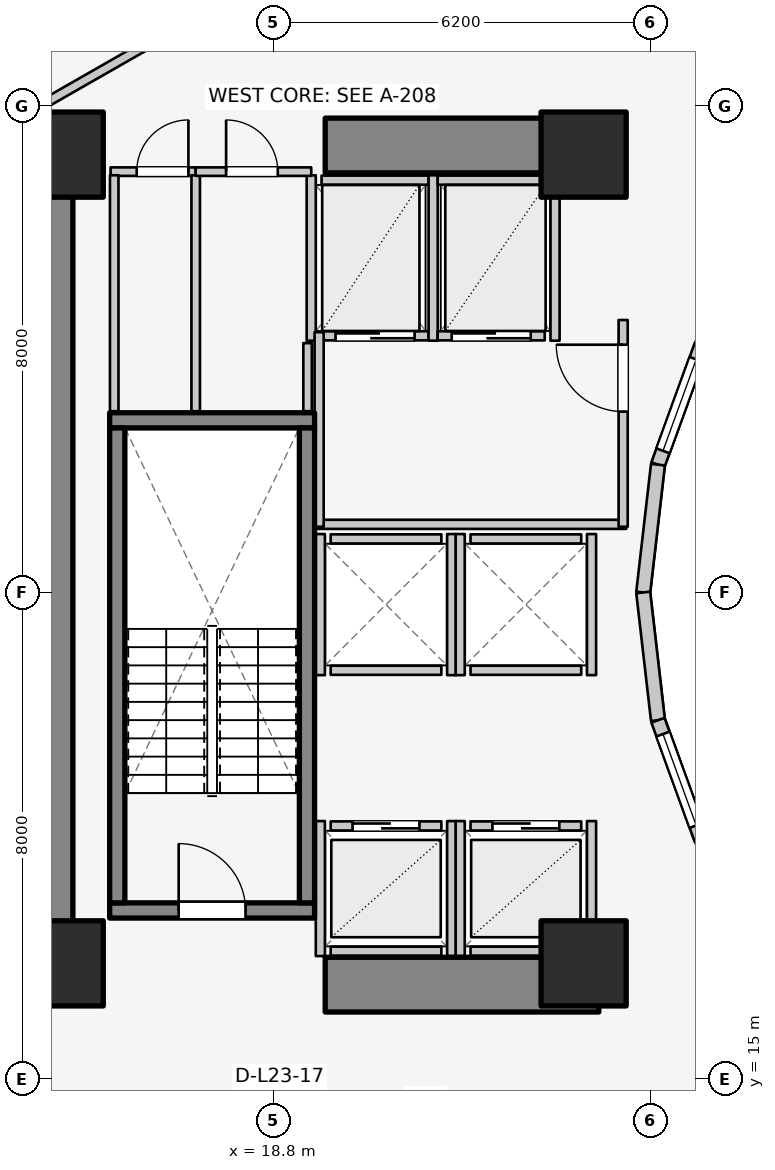
"""IFC4 building model, lengths in metres.
Left out: names, types, materials, properties, quantities, classifications, styles, units other than length and angle.
Written with IfcOpenShell. Run it as: python <this file> out.ifc"""

import sys

from ifc_helpers import new_model, si_unit, direction, frame, frame_2d, origin, origin_2d, place, context, subcontext, project, spatial, rectangle, extrude, element, fill, save


model = new_model("IFC4")
c1 = context("Model", 3, precision=1e-05, world=origin(), true_north=direction((0.0, 1.0)))
c2 = subcontext(c1, "Body", "Model", "MODEL_VIEW")
j1 = project(units=[si_unit("LENGTHUNIT", "METRE"), si_unit("PLANEANGLEUNIT", "RADIAN")], contexts=[c1])
p1 = place(None, origin())
s1 = spatial("IfcSite", under=j1, at=p1, CompositionType="ELEMENT")
p2 = place(p1, origin())
s2 = spatial("IfcBuilding", under=s1, at=p2, CompositionType="ELEMENT")
p3 = place(p2, frame((0.0, 0.0, 79.4)))
s3 = spatial("IfcBuildingStorey", under=s2, at=p3, CompositionType="ELEMENT", Elevation=79.4)
p4 = place(p3, frame((15.05, 17.05, 0.0), z_axis=(0.0, 0.0, 1.0), x_axis=(0.0, 1.0, 0.0)))
e1 = element("IfcWall", 1, at=p4, inside=s3, PredefinedType="SHEAR", context=c2, shape_type="SweptSolid", body=[
    extrude(rectangle(XDim=12.8, YDim=0.9, at=frame_2d((6.4, 0.0))), origin(), (0.0, 0.0, 1.0), 3.1),
])
for number, where, z_axis, x_axis in (
    (2, (19.65, 16.55, 0.0), (0.0, 0.0, 1.0), (1.0, 0.0, 0.0)),
    (3, (19.65, 30.35, 0.0), (0.0, 0.0, 1.0), (1.0, 0.0, 0.0)),
):
    element("IfcWall", number, at=place(p3, frame(where, z_axis=z_axis, x_axis=x_axis)), inside=s3, PredefinedType="SHEAR", context=c2, shape_type="SweptSolid", body=[
        extrude(rectangle(XDim=4.5, YDim=0.9, at=frame_2d((2.25, 0.0))), origin(), (0.0, 0.0, 1.0), 3.1),
    ])
p5 = place(p3, frame((16.105, 17.77, 0.0), z_axis=(0.0, 0.0, 1.0), x_axis=(1.0, 0.0, 0.0)))
e4 = element("IfcWall", 4, at=p5, inside=s3, PredefinedType="SOLIDWALL", context=c2, shape_type="SweptSolid", body=[
    extrude(rectangle(XDim=3.37, YDim=0.25, at=frame_2d((1.685, 0.0))), origin(), (0.0, 0.0, 1.0), 3.1),
])
p6 = place(p5, frame((1.135, 0.0, 0.0)))
e5 = element("IfcOpeningElement", 5, at=p6, cuts=e4, PredefinedType="OPENING", context=c2, shape_type="SweptSolid", body=[
    extrude(rectangle(XDim=1.1, YDim=2.1, at=frame_2d((0.55, 1.05))), frame((0.0, 0.135, 0.0), z_axis=(0.0, -1.0, 0.0), x_axis=(1.0, 0.0, 0.0)), (0.0, 0.0, 1.0), 0.27),
])
p7 = place(p3, frame((16.105, 25.83, 0.0), z_axis=(0.0, 0.0, 1.0), x_axis=(1.0, 0.0, 0.0)))
e6 = element("IfcWall", 6, at=p7, inside=s3, PredefinedType="SOLIDWALL", context=c2, shape_type="SweptSolid", body=[
    extrude(rectangle(XDim=3.37, YDim=0.25, at=frame_2d((1.685, 0.0))), origin(), (0.0, 0.0, 1.0), 3.1),
])
for number, where, z_axis, x_axis in (
    (7, (16.23, 17.895, 0.0), (0.0, 0.0, 1.0), (0.0, 1.0, 0.0)),
    (8, (19.35, 17.895, 0.0), (0.0, 0.0, 1.0), (0.0, 1.0, 0.0)),
):
    element("IfcWall", number, at=place(p3, frame(where, z_axis=z_axis, x_axis=x_axis)), inside=s3, PredefinedType="SOLIDWALL", context=c2, shape_type="SweptSolid", body=[
        extrude(rectangle(XDim=7.81, YDim=0.25, at=frame_2d((3.905, 0.0))), origin(), (0.0, 0.0, 1.0), 3.1),
    ])
for number, where, z_axis, x_axis in (
    (9, (15.3, 16.9, 0.0), (0.0, 0.0, 1.0), (1.0, 0.0, 0.0)),
    (10, (23.9, 16.9, 0.0), (0.0, 0.0, 1.0), (1.0, 0.0, 0.0)),
    (11, (23.9, 30.2, 0.0), (0.0, 0.0, 1.0), (1.0, 0.0, 0.0)),
    (12, (15.3, 30.2, 0.0), (0.0, 0.0, 1.0), (1.0, 0.0, 0.0)),
):
    element("IfcColumn", number, at=place(p3, frame(where, z_axis=z_axis, x_axis=x_axis)), inside=s3, PredefinedType="COLUMN", context=c2, shape_type="SweptSolid", body=[
        extrude(rectangle(XDim=1.4, YDim=1.4, at=origin_2d()), origin(), (0.0, 0.0, 1.0), 3.1),
    ])
p8 = place(p3, frame((25.834, 27.06, 0.0), z_axis=(0.0, 0.0, 1.0), x_axis=(-0.341423187295, -0.93990968033, 0.0)))
e13 = element("IfcWall", 13, at=p8, inside=s3, PredefinedType="STANDARD", context=c2, shape_type="SweptSolid", body=[
    extrude(rectangle(XDim=2.084, YDim=0.23, at=frame_2d((1.042, 0.0))), origin(), (0.0, 0.0, 1.0), 2.84),
])
p9 = place(p8, frame((0.242, 0.0, 0.85)))
e14 = element("IfcOpeningElement", 14, at=p9, cuts=e13, PredefinedType="OPENING", context=c2, shape_type="SweptSolid", body=[
    extrude(rectangle(XDim=1.6, YDim=1.65, at=frame_2d((0.8, 0.825))), frame((0.0, 0.125, 0.0), z_axis=(0.0, -1.0, 0.0), x_axis=(1.0, 0.0, 0.0)), (0.0, 0.0, 1.0), 0.25),
])
for number, where, z_axis, x_axis in (
    (15, (25.123, 25.102, 0.0), (0.0, 0.0, 1.0), (-0.115, -0.993, 0.0)),
    (16, (24.88, 23.0, 0.0), (0.0, 0.0, 1.0), (0.115, -0.993, 0.0)),
):
    element("IfcWall", number, at=place(p3, frame(where, z_axis=z_axis, x_axis=x_axis)), inside=s3, PredefinedType="STANDARD", context=c2, shape_type="SweptSolid", body=[
        extrude(rectangle(XDim=2.115, YDim=0.23, at=frame_2d((1.058, 0.0))), origin(), (0.0, 0.0, 1.0), 2.84),
    ])
p10 = place(p3, frame((25.123, 20.898, 0.0), z_axis=(0.0, 0.0, 1.0), x_axis=(0.341423187295, -0.93990968033, 0.0)))
e17 = element("IfcWall", 17, at=p10, inside=s3, PredefinedType="STANDARD", context=c2, shape_type="SweptSolid", body=[
    extrude(rectangle(XDim=2.084, YDim=0.23, at=frame_2d((1.042, 0.0))), origin(), (0.0, 0.0, 1.0), 2.84),
])
p11 = place(p10, frame((0.242, 0.0, 0.85)))
e18 = element("IfcOpeningElement", 18, at=p11, cuts=e17, PredefinedType="OPENING", context=c2, shape_type="SweptSolid", body=[
    extrude(rectangle(XDim=1.6, YDim=1.65, at=frame_2d((0.8, 0.825))), frame((0.0, 0.125, 0.0), z_axis=(0.0, -1.0, 0.0), x_axis=(1.0, 0.0, 0.0)), (0.0, 0.0, 1.0), 0.25),
])
p12 = place(p3, frame((19.74, 19.16, 0.0), z_axis=(0.0, 0.0, 1.0), x_axis=(1.0, 0.0, 0.0)))
e19 = element("IfcWall", 19, at=p12, inside=s3, PredefinedType="SOLIDWALL", context=c2, shape_type="SweptSolid", body=[
    extrude(rectangle(XDim=1.82, YDim=0.15, at=frame_2d((0.91, 0.0))), origin(), (0.0, 0.0, 1.0), 2.855),
])
p13 = place(p12, frame((0.36, 0.0, 0.0)))
e20 = element("IfcOpeningElement", 20, at=p13, cuts=e19, PredefinedType="OPENING", context=c2, shape_type="SweptSolid", body=[
    extrude(rectangle(XDim=1.1, YDim=2.1, at=frame_2d((0.55, 1.05))), frame((0.0, 0.085, 0.0), z_axis=(0.0, -1.0, 0.0), x_axis=(1.0, 0.0, 0.0)), (0.0, 0.0, 1.0), 0.17),
])
p14 = place(p3, frame((19.74, 17.1, 0.0), z_axis=(0.0, 0.0, 1.0), x_axis=(1.0, 0.0, 0.0)))
e21 = element("IfcWall", 21, at=p14, inside=s3, PredefinedType="SOLIDWALL", context=c2, shape_type="SweptSolid", body=[
    extrude(rectangle(XDim=1.82, YDim=0.15, at=frame_2d((0.91, 0.0))), origin(), (0.0, 0.0, 1.0), 2.855),
])
p15 = place(p3, frame((19.57, 17.02, 0.0), z_axis=(0.0, 0.0, 1.0), x_axis=(0.0, 1.0, 0.0)))
e22 = element("IfcWall", 22, at=p15, inside=s3, PredefinedType="SOLIDWALL", context=c2, shape_type="SweptSolid", body=[
    extrude(rectangle(XDim=2.22, YDim=0.15, at=frame_2d((1.11, 0.0))), origin(), (0.0, 0.0, 1.0), 2.12),
])
p16 = place(p3, frame((21.73, 17.02, 0.0), z_axis=(0.0, 0.0, 1.0), x_axis=(0.0, 1.0, 0.0)))
e23 = element("IfcWall", 23, at=p16, inside=s3, PredefinedType="SOLIDWALL", context=c2, shape_type="SweptSolid", body=[
    extrude(rectangle(XDim=2.22, YDim=0.15, at=frame_2d((1.11, 0.0))), origin(), (0.0, 0.0, 1.0), 2.855),
])
p17 = place(p3, frame((22.04, 19.16, 0.0), z_axis=(0.0, 0.0, 1.0), x_axis=(1.0, 0.0, 0.0)))
e24 = element("IfcWall", 24, at=p17, inside=s3, PredefinedType="SOLIDWALL", context=c2, shape_type="SweptSolid", body=[
    extrude(rectangle(XDim=1.82, YDim=0.15, at=frame_2d((0.91, 0.0))), origin(), (0.0, 0.0, 1.0), 2.12),
])
p18 = place(p17, frame((0.36, 0.0, 0.0)))
e25 = element("IfcOpeningElement", 25, at=p18, cuts=e24, PredefinedType="OPENING", context=c2, shape_type="SweptSolid", body=[
    extrude(rectangle(XDim=1.1, YDim=2.1, at=frame_2d((0.55, 1.05))), frame((0.0, 0.085, 0.0), z_axis=(0.0, -1.0, 0.0), x_axis=(1.0, 0.0, 0.0)), (0.0, 0.0, 1.0), 0.17),
])
p19 = place(p3, frame((22.04, 17.1, 0.0), z_axis=(0.0, 0.0, 1.0), x_axis=(1.0, 0.0, 0.0)))
e26 = element("IfcWall", 26, at=p19, inside=s3, PredefinedType="SOLIDWALL", context=c2, shape_type="SweptSolid", body=[
    extrude(rectangle(XDim=1.82, YDim=0.15, at=frame_2d((0.91, 0.0))), origin(), (0.0, 0.0, 1.0), 2.12),
])
p20 = place(p3, frame((21.87, 17.02, 0.0), z_axis=(0.0, 0.0, 1.0), x_axis=(0.0, 1.0, 0.0)))
e27 = element("IfcWall", 27, at=p20, inside=s3, PredefinedType="SOLIDWALL", context=c2, shape_type="SweptSolid", body=[
    extrude(rectangle(XDim=2.22, YDim=0.15, at=frame_2d((1.11, 0.0))), origin(), (0.0, 0.0, 1.0), 2.855),
])
p21 = place(p3, frame((24.03, 17.02, 0.0), z_axis=(0.0, 0.0, 1.0), x_axis=(0.0, 1.0, 0.0)))
e28 = element("IfcWall", 28, at=p21, inside=s3, PredefinedType="SOLIDWALL", context=c2, shape_type="SweptSolid", body=[
    extrude(rectangle(XDim=2.22, YDim=0.15, at=frame_2d((1.11, 0.0))), origin(), (0.0, 0.0, 1.0), 2.12),
])
for number, where, z_axis, x_axis in (
    (29, (19.74, 21.72, 0.0), (0.0, 0.0, 1.0), (1.0, 0.0, 0.0)),
    (30, (19.74, 23.88, 0.0), (0.0, 0.0, 1.0), (1.0, 0.0, 0.0)),
):
    element("IfcWall", number, at=place(p3, frame(where, z_axis=z_axis, x_axis=x_axis)), inside=s3, PredefinedType="SOLIDWALL", context=c2, shape_type="SweptSolid", body=[
        extrude(rectangle(XDim=1.82, YDim=0.15, at=frame_2d((0.91, 0.0))), origin(), (0.0, 0.0, 1.0), 2.855),
    ])
for number, where, z_axis, x_axis in (
    (31, (19.57, 21.64, 0.0), (0.0, 0.0, 1.0), (0.0, 1.0, 0.0)),
    (32, (21.73, 21.64, 0.0), (0.0, 0.0, 1.0), (0.0, 1.0, 0.0)),
):
    element("IfcWall", number, at=place(p3, frame(where, z_axis=z_axis, x_axis=x_axis)), inside=s3, PredefinedType="SOLIDWALL", context=c2, shape_type="SweptSolid", body=[
        extrude(rectangle(XDim=2.32, YDim=0.15, at=frame_2d((1.16, 0.0))), origin(), (0.0, 0.0, 1.0), 2.855),
    ])
for number, where, z_axis, x_axis in (
    (33, (22.04, 21.72, 0.0), (0.0, 0.0, 1.0), (1.0, 0.0, 0.0)),
    (34, (22.04, 23.88, 0.0), (0.0, 0.0, 1.0), (1.0, 0.0, 0.0)),
):
    element("IfcWall", number, at=place(p3, frame(where, z_axis=z_axis, x_axis=x_axis)), inside=s3, PredefinedType="SOLIDWALL", context=c2, shape_type="SweptSolid", body=[
        extrude(rectangle(XDim=1.82, YDim=0.15, at=frame_2d((0.91, 0.0))), origin(), (0.0, 0.0, 1.0), 2.12),
    ])
p22 = place(p3, frame((21.87, 21.64, 0.0), z_axis=(0.0, 0.0, 1.0), x_axis=(0.0, 1.0, 0.0)))
e35 = element("IfcWall", 35, at=p22, inside=s3, PredefinedType="SOLIDWALL", context=c2, shape_type="SweptSolid", body=[
    extrude(rectangle(XDim=2.32, YDim=0.15, at=frame_2d((1.16, 0.0))), origin(), (0.0, 0.0, 1.0), 2.855),
])
p23 = place(p3, frame((24.03, 21.64, 0.0), z_axis=(0.0, 0.0, 1.0), x_axis=(0.0, 1.0, 0.0)))
e36 = element("IfcWall", 36, at=p23, inside=s3, PredefinedType="SOLIDWALL", context=c2, shape_type="SweptSolid", body=[
    extrude(rectangle(XDim=2.32, YDim=0.15, at=frame_2d((1.16, 0.0))), origin(), (0.0, 0.0, 1.0), 2.12),
])
p24 = place(p3, frame((19.59, 27.22, 0.0), z_axis=(0.0, 0.0, 1.0), x_axis=(1.0, 0.0, 0.0)))
e37 = element("IfcWall", 37, at=p24, inside=s3, PredefinedType="SOLIDWALL", context=c2, shape_type="SweptSolid", body=[
    extrude(rectangle(XDim=1.76, YDim=0.15, at=frame_2d((0.88, 0.0))), origin(), (0.0, 0.0, 1.0), 2.855),
])
p25 = place(p24, frame((0.23, 0.0, 0.0)))
e38 = element("IfcOpeningElement", 38, at=p25, cuts=e37, PredefinedType="OPENING", context=c2, shape_type="SweptSolid", body=[
    extrude(rectangle(XDim=1.3, YDim=2.1, at=frame_2d((0.65, 1.05))), frame((0.0, 0.085, 0.0), z_axis=(0.0, -1.0, 0.0), x_axis=(1.0, 0.0, 0.0)), (0.0, 0.0, 1.0), 0.17),
])
p26 = place(p3, frame((19.59, 29.78, 0.0), z_axis=(0.0, 0.0, 1.0), x_axis=(1.0, 0.0, 0.0)))
e39 = element("IfcWall", 39, at=p26, inside=s3, PredefinedType="SOLIDWALL", context=c2, shape_type="SweptSolid", body=[
    extrude(rectangle(XDim=1.76, YDim=0.15, at=frame_2d((0.88, 0.0))), origin(), (0.0, 0.0, 1.0), 2.855),
])
for number, where, z_axis, x_axis in (
    (40, (19.42, 27.14, 0.0), (0.0, 0.0, 1.0), (0.0, 1.0, 0.0)),
    (41, (21.425, 27.14, 0.0), (0.0, 0.0, 1.0), (0.0, 1.0, 0.0)),
):
    element("IfcWall", number, at=place(p3, frame(where, z_axis=z_axis, x_axis=x_axis)), inside=s3, PredefinedType="SOLIDWALL", context=c2, shape_type="SweptSolid", body=[
        extrude(rectangle(XDim=2.72, YDim=0.15, at=frame_2d((1.36, 0.0))), origin(), (0.0, 0.0, 1.0), 2.855),
    ])
p27 = place(p3, frame((21.5, 27.22, 0.0), z_axis=(0.0, 0.0, 1.0), x_axis=(1.0, 0.0, 0.0)))
e42 = element("IfcWall", 42, at=p27, inside=s3, PredefinedType="SOLIDWALL", context=c2, shape_type="SweptSolid", body=[
    extrude(rectangle(XDim=1.76, YDim=0.15, at=frame_2d((0.88, 0.0))), origin(), (0.0, 0.0, 1.0), 2.855),
])
p28 = place(p27, frame((0.23, 0.0, 0.0)))
e43 = element("IfcOpeningElement", 43, at=p28, cuts=e42, PredefinedType="OPENING", context=c2, shape_type="SweptSolid", body=[
    extrude(rectangle(XDim=1.3, YDim=2.1, at=frame_2d((0.65, 1.05))), frame((0.0, 0.085, 0.0), z_axis=(0.0, -1.0, 0.0), x_axis=(1.0, 0.0, 0.0)), (0.0, 0.0, 1.0), 0.17),
])
p29 = place(p3, frame((21.5, 29.78, 0.0), z_axis=(0.0, 0.0, 1.0), x_axis=(1.0, 0.0, 0.0)))
e44 = element("IfcWall", 44, at=p29, inside=s3, PredefinedType="SOLIDWALL", context=c2, shape_type="SweptSolid", body=[
    extrude(rectangle(XDim=1.76, YDim=0.15, at=frame_2d((0.88, 0.0))), origin(), (0.0, 0.0, 1.0), 2.855),
])
p30 = place(p3, frame((23.43, 27.14, 0.0), z_axis=(0.0, 0.0, 1.0), x_axis=(0.0, 1.0, 0.0)))
e45 = element("IfcWall", 45, at=p30, inside=s3, PredefinedType="SOLIDWALL", context=c2, shape_type="SweptSolid", body=[
    extrude(rectangle(XDim=2.72, YDim=0.15, at=frame_2d((1.36, 0.0))), origin(), (0.0, 0.0, 1.0), 2.855),
])
p31 = place(p3, frame((19.52, 24.12, 0.0), z_axis=(0.0, 0.0, 1.0), x_axis=(1.0, 0.0, 0.0)))
e46 = element("IfcWall", 46, at=p31, inside=s3, PredefinedType="PARTITIONING", context=c2, shape_type="SweptSolid", body=[
    extrude(rectangle(XDim=5.08, YDim=0.15, at=frame_2d((2.54, 0.0))), origin(), (0.0, 0.0, 1.0), 2.12),
])
p32 = place(p3, frame((19.55, 24.08, 0.0), z_axis=(0.0, 0.0, 1.0), x_axis=(0.0, 1.0, 0.0)))
e47 = element("IfcWall", 47, at=p32, inside=s3, PredefinedType="PARTITIONING", context=c2, shape_type="SweptSolid", body=[
    extrude(rectangle(XDim=3.2, YDim=0.15, at=frame_2d((1.6, 0.0))), origin(), (0.0, 0.0, 1.0), 2.855),
])
p33 = place(p3, frame((24.55, 24.08, 0.0), z_axis=(0.0, 0.0, 1.0), x_axis=(0.0, 1.0, 0.0)))
e48 = element("IfcWall", 48, at=p33, inside=s3, PredefinedType="PARTITIONING", context=c2, shape_type="SweptSolid", body=[
    extrude(rectangle(XDim=3.4, YDim=0.15, at=frame_2d((1.7, 0.0))), origin(), (0.0, 0.0, 1.0), 2.855),
])
p34 = place(p33, frame((1.894, 0.0, 0.0)))
e49 = element("IfcOpeningElement", 49, at=p34, cuts=e48, PredefinedType="OPENING", context=c2, shape_type="SweptSolid", body=[
    extrude(rectangle(XDim=1.1, YDim=2.1, at=frame_2d((0.55, 1.05))), frame((0.0, 0.085, 0.0), z_axis=(0.0, -1.0, 0.0), x_axis=(1.0, 0.0, 0.0)), (0.0, 0.0, 1.0), 0.17),
])
p35 = place(p3, frame((16.12, 29.92, 0.0), z_axis=(0.0, 0.0, 1.0), x_axis=(1.0, 0.0, 0.0)))
e50 = element("IfcWall", 50, at=p35, inside=s3, PredefinedType="PLUMBINGWALL", context=c2, shape_type="SweptSolid", body=[
    extrude(rectangle(XDim=1.4, YDim=0.14, at=frame_2d((0.7, 0.0))), origin(), (0.0, 0.0, 1.0), 2.855),
])
p36 = place(p35, frame((0.43, 0.0, 0.0)))
e51 = element("IfcOpeningElement", 51, at=p36, cuts=e50, PredefinedType="OPENING", context=c2, shape_type="SweptSolid", body=[
    extrude(rectangle(XDim=0.85, YDim=2.05, at=frame_2d((0.425, 1.025))), frame((0.0, 0.08, 0.0), z_axis=(0.0, -1.0, 0.0), x_axis=(1.0, 0.0, 0.0)), (0.0, 0.0, 1.0), 0.16),
])
for number, where, z_axis, x_axis in (
    (52, (16.18, 25.98, 0.0), (0.0, 0.0, 1.0), (0.0, 1.0, 0.0)),
    (53, (17.52, 25.98, 0.0), (0.0, 0.0, 1.0), (0.0, 1.0, 0.0)),
):
    element("IfcWall", number, at=place(p3, frame(where, z_axis=z_axis, x_axis=x_axis)), inside=s3, PredefinedType="PLUMBINGWALL", context=c2, shape_type="SweptSolid", body=[
        extrude(rectangle(XDim=3.88, YDim=0.14, at=frame_2d((1.94, 0.0))), origin(), (0.0, 0.0, 1.0), 2.855),
    ])
p37 = place(p3, frame((17.52, 29.92, 0.0), z_axis=(0.0, 0.0, 1.0), x_axis=(1.0, 0.0, 0.0)))
e54 = element("IfcWall", 54, at=p37, inside=s3, PredefinedType="PLUMBINGWALL", context=c2, shape_type="SweptSolid", body=[
    extrude(rectangle(XDim=1.9, YDim=0.14, at=frame_2d((0.95, 0.0))), origin(), (0.0, 0.0, 1.0), 2.855),
])
p38 = place(p37, frame((0.5, 0.0, 0.0)))
e55 = element("IfcOpeningElement", 55, at=p38, cuts=e54, PredefinedType="OPENING", context=c2, shape_type="SweptSolid", body=[
    extrude(rectangle(XDim=0.85, YDim=2.05, at=frame_2d((0.425, 1.025))), frame((0.0, 0.08, 0.0), z_axis=(0.0, -1.0, 0.0), x_axis=(1.0, 0.0, 0.0)), (0.0, 0.0, 1.0), 0.16),
])
p39 = place(p3, frame((19.36, 25.98, 0.0), z_axis=(0.0, 0.0, 1.0), x_axis=(0.0, 1.0, 0.0)))
e56 = element("IfcWall", 56, at=p39, inside=s3, PredefinedType="PLUMBINGWALL", context=c2, shape_type="SweptSolid", body=[
    extrude(rectangle(XDim=1.12, YDim=0.14, at=frame_2d((0.56, 0.0))), origin(), (0.0, 0.0, 1.0), 2.855),
])
p40 = place(p3, frame((17.243, 32.305, 0.0), z_axis=(0.0, 0.0, 1.0), x_axis=(-0.867991349648, -0.496579315857, 0.0)))
e57 = element("IfcWall", 57, at=p40, inside=s3, PredefinedType="PARTITIONING", context=c2, shape_type="SweptSolid", body=[
    extrude(rectangle(XDim=2.567, YDim=0.15, at=frame_2d((1.283, 0.0))), origin(), (0.0, 0.0, 1.0), 2.142),
])
p41 = place(p9, origin())
e58 = element("IfcWindow", 58, at=p41, inside=s3, PartitioningType="SINGLE_PANEL", PredefinedType="WINDOW", context=c2, shape_type="SweptSolid", body=[
    extrude(rectangle(XDim=1.6, YDim=1.65, at=frame_2d((0.8, 0.825))), frame((0.0, 0.03, 0.0), z_axis=(0.0, -1.0, 0.0), x_axis=(1.0, 0.0, 0.0)), (0.0, 0.0, 1.0), 0.06),
])
fill(e14, e58)
p42 = place(p11, origin())
e59 = element("IfcWindow", 59, at=p42, inside=s3, PartitioningType="SINGLE_PANEL", PredefinedType="WINDOW", context=c2, shape_type="SweptSolid", body=[
    extrude(rectangle(XDim=1.6, YDim=1.65, at=frame_2d((0.8, 0.825))), frame((0.0, 0.03, 0.0), z_axis=(0.0, -1.0, 0.0), x_axis=(1.0, 0.0, 0.0)), (0.0, 0.0, 1.0), 0.06),
])
fill(e18, e59)
p43 = place(p6, origin())
e60 = element("IfcDoor", 60, at=p43, inside=s3, OperationType="SINGLE_SWING_LEFT", PredefinedType="DOOR", context=c2, shape_type="SweptSolid", body=[
    extrude(rectangle(XDim=1.1, YDim=2.1, at=frame_2d((0.55, 1.05))), frame((0.0, 0.025, 0.0), z_axis=(0.0, -1.0, 0.0), x_axis=(1.0, 0.0, 0.0)), (0.0, 0.0, 1.0), 0.05),
])
fill(e5, e60)
p44 = place(p13, origin())
e61 = element("IfcDoor", 61, at=p44, inside=s3, OperationType="DOUBLE_DOOR_SLIDING", PredefinedType="DOOR", context=c2, shape_type="SweptSolid", body=[
    extrude(rectangle(XDim=1.1, YDim=2.1, at=frame_2d((0.55, 1.05))), frame((0.0, 0.025, 0.0), z_axis=(0.0, -1.0, 0.0), x_axis=(1.0, 0.0, 0.0)), (0.0, 0.0, 1.0), 0.05),
])
fill(e20, e61)
p45 = place(p18, origin())
e62 = element("IfcDoor", 62, at=p45, inside=s3, OperationType="DOUBLE_DOOR_SLIDING", PredefinedType="DOOR", context=c2, shape_type="SweptSolid", body=[
    extrude(rectangle(XDim=1.1, YDim=2.1, at=frame_2d((0.55, 1.05))), frame((0.0, 0.025, 0.0), z_axis=(0.0, -1.0, 0.0), x_axis=(1.0, 0.0, 0.0)), (0.0, 0.0, 1.0), 0.05),
])
fill(e25, e62)
p46 = place(p25, origin())
e63 = element("IfcDoor", 63, at=p46, inside=s3, OperationType="DOUBLE_DOOR_SLIDING", PredefinedType="DOOR", context=c2, shape_type="SweptSolid", body=[
    extrude(rectangle(XDim=1.3, YDim=2.1, at=frame_2d((0.65, 1.05))), frame((0.0, 0.025, 0.0), z_axis=(0.0, -1.0, 0.0), x_axis=(1.0, 0.0, 0.0)), (0.0, 0.0, 1.0), 0.05),
])
fill(e38, e63)
p47 = place(p28, origin())
e64 = element("IfcDoor", 64, at=p47, inside=s3, OperationType="DOUBLE_DOOR_SLIDING", PredefinedType="DOOR", context=c2, shape_type="SweptSolid", body=[
    extrude(rectangle(XDim=1.3, YDim=2.1, at=frame_2d((0.65, 1.05))), frame((0.0, 0.025, 0.0), z_axis=(0.0, -1.0, 0.0), x_axis=(1.0, 0.0, 0.0)), (0.0, 0.0, 1.0), 0.05),
])
fill(e43, e64)
p48 = place(p34, origin())
e65 = element("IfcDoor", 65, at=p48, inside=s3, OperationType="SINGLE_SWING_RIGHT", PredefinedType="DOOR", context=c2, shape_type="SweptSolid", body=[
    extrude(rectangle(XDim=1.1, YDim=2.1, at=frame_2d((0.55, 1.05))), frame((0.0, 0.025, 0.0), z_axis=(0.0, -1.0, 0.0), x_axis=(1.0, 0.0, 0.0)), (0.0, 0.0, 1.0), 0.05),
])
fill(e49, e65)
p49 = place(p36, origin())
e66 = element("IfcDoor", 66, at=p49, inside=s3, OperationType="SINGLE_SWING_RIGHT", PredefinedType="DOOR", context=c2, shape_type="SweptSolid", body=[
    extrude(rectangle(XDim=0.85, YDim=2.05, at=frame_2d((0.425, 1.025))), frame((0.0, 0.025, 0.0), z_axis=(0.0, -1.0, 0.0), x_axis=(1.0, 0.0, 0.0)), (0.0, 0.0, 1.0), 0.05),
])
fill(e51, e66)
p50 = place(p38, origin())
e67 = element("IfcDoor", 67, at=p50, inside=s3, OperationType="SINGLE_SWING_LEFT", PredefinedType="DOOR", context=c2, shape_type="SweptSolid", body=[
    extrude(rectangle(XDim=0.85, YDim=2.05, at=frame_2d((0.425, 1.025))), frame((0.0, 0.025, 0.0), z_axis=(0.0, -1.0, 0.0), x_axis=(1.0, 0.0, 0.0)), (0.0, 0.0, 1.0), 0.05),
])
fill(e55, e67)
save(model, sys.argv[1])
